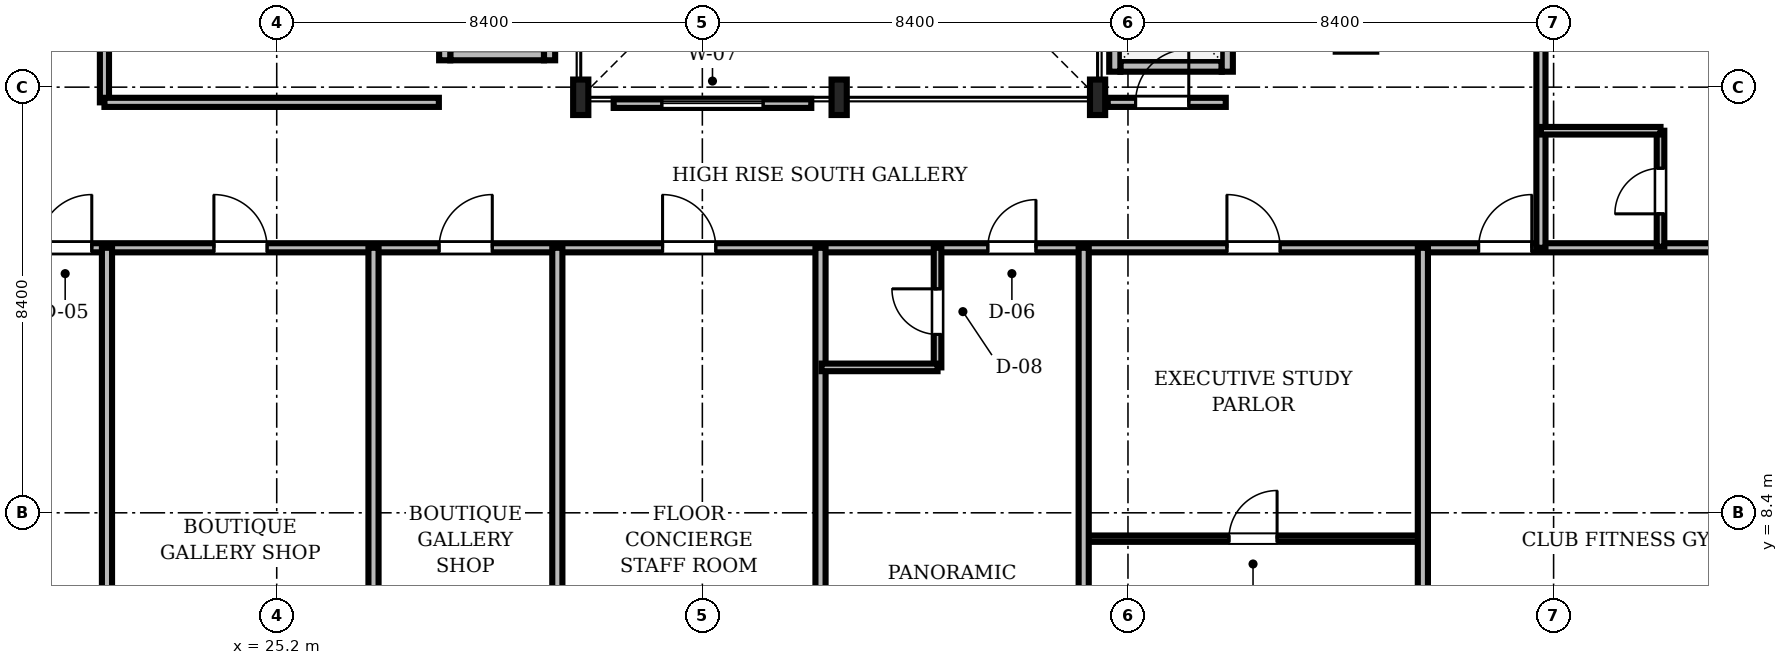
"""IFC4 building model, lengths in metres.
Left out: names, types, materials, properties, quantities, classifications, styles, units other than length and angle.
Written with IfcOpenShell. Run it as: python <this file> out.ifc"""

import sys

from ifc_helpers import new_model, si_unit, direction, frame, frame_2d, origin, origin_2d, place, context, subcontext, project, spatial, rectangle, i_section, extrude, source, transform, mapped, element, fill, save


model = new_model("IFC4")
c1 = context("Model", 3, precision=1e-05, world=origin(), true_north=direction((0.0, 1.0)))
c2 = subcontext(c1, "Body", "Model", "MODEL_VIEW")
j1 = project(units=[si_unit("LENGTHUNIT", "METRE"), si_unit("PLANEANGLEUNIT", "RADIAN")], contexts=[c1])
p1 = place(None, origin())
s1 = spatial("IfcSite", under=j1, at=p1, CompositionType="ELEMENT")
p2 = place(p1, origin())
s2 = spatial("IfcBuilding", under=s1, at=p2, CompositionType="ELEMENT")
p3 = place(p2, frame((0.0, 0.0, 196.05)))
s3 = spatial("IfcBuildingStorey", under=s2, at=p3, CompositionType="ELEMENT", Elevation=196.05)
m1 = source(origin(), c2, "Body", "SweptSolid", [
    extrude(i_section(OverallWidth=0.3, OverallDepth=0.7, WebThickness=0.017, FlangeThickness=0.032, FilletRadius=0.027, at=origin_2d()), origin(), (0.0, 0.0, 1.0), 3.53),
])
for number, where, z_axis, x_axis in (
    (1, (31.2, 16.6, 0.0), (0.0, 0.0, 1.0), (1.0, 0.0, 0.0)),
    (2, (36.3, 16.6, 0.0), (0.0, 0.0, 1.0), (1.0, 0.0, 0.0)),
    (3, (41.4, 16.6, 0.0), (0.0, 0.0, 1.0), (1.0, 0.0, 0.0)),
):
    element("IfcColumn", number, at=place(p3, frame(where, z_axis=z_axis, x_axis=x_axis)), inside=s3, PredefinedType="COLUMN", context=c2, shape_type="MappedRepresentation", body=[
        mapped(m1, transform((0.0, 0.0, 0.0), scale=1.0)),
    ])
m2 = source(origin(), c2, "Body", "SweptSolid", [
    extrude(rectangle(XDim=2.0, YDim=0.22, at=frame_2d((1.0, 0.0))), origin(), (0.0, 0.0, 1.0), 3.53),
])
p4 = place(p3, frame((41.85, 17.215, 0.0), z_axis=(0.0, 0.0, 1.0), x_axis=(1.0, 0.0, 0.0)))
e4 = element("IfcWall", 4, at=p4, inside=s3, PredefinedType="SOLIDWALL", context=c2, shape_type="MappedRepresentation", body=[
    mapped(m2, transform((0.0, 0.0, 0.0), scale=1.0)),
])
m3 = source(origin(), c2, "Body", "SweptSolid", [
    extrude(rectangle(XDim=2.19, YDim=0.22, at=frame_2d((1.095, 0.0))), origin(), (0.0, 0.0, 1.0), 3.53),
])
p5 = place(p3, frame((41.74, 17.105, 0.0), z_axis=(0.0, 0.0, 1.0), x_axis=(0.0, 1.0, 0.0)))
e5 = element("IfcWall", 5, at=p5, inside=s3, PredefinedType="SOLIDWALL", context=c2, shape_type="MappedRepresentation", body=[
    mapped(m3, transform((0.0, 0.0, 0.0), scale=1.0)),
])
p6 = place(p3, frame((43.96, 17.105, 0.0), z_axis=(0.0, 0.0, 1.0), x_axis=(0.0, 1.0, 0.0)))
e6 = element("IfcWall", 6, at=p6, inside=s3, PredefinedType="SOLIDWALL", context=c2, shape_type="MappedRepresentation", body=[
    mapped(m3, transform((0.0, 0.0, 0.0), scale=1.0)),
])
m4 = source(origin(), c2, "Body", "SweptSolid", [
    extrude(rectangle(XDim=1.1, YDim=2.2, at=frame_2d((0.55, 1.1))), frame((0.0, 0.12, 0.0), z_axis=(0.0, -1.0, 0.0), x_axis=(1.0, 0.0, 0.0)), (0.0, 0.0, 1.0), 0.24),
])
p7 = place(p6, frame((0.545, 0.0, 0.0)))
e7 = element("IfcOpeningElement", 7, at=p7, cuts=e6, PredefinedType="OPENING", context=c2, shape_type="MappedRepresentation", body=[
    mapped(m4, transform((0.0, 0.0, 0.0), scale=1.0)),
])
m5 = source(origin(), c2, "Body", "SweptSolid", [
    extrude(rectangle(XDim=1.85, YDim=0.22, at=frame_2d((0.925, 0.0))), origin(), (0.0, 0.0, 1.0), 2.972),
])
p8 = place(p3, frame((28.625, 17.44, 0.0), z_axis=(0.0, 0.0, 1.0), x_axis=(1.0, 0.0, 0.0)))
e8 = element("IfcWall", 8, at=p8, inside=s3, PredefinedType="SOLIDWALL", context=c2, shape_type="MappedRepresentation", body=[
    mapped(m5, transform((0.0, 0.0, 0.0), scale=1.0)),
])
m6 = source(origin(), c2, "Body", "SweptSolid", [
    extrude(rectangle(XDim=2.54, YDim=0.22, at=frame_2d((1.27, 0.0))), origin(), (0.0, 0.0, 1.0), 2.972),
])
p9 = place(p3, frame((28.515, 17.33, 0.0), z_axis=(0.0, 0.0, 1.0), x_axis=(0.0, 1.0, 0.0)))
e9 = element("IfcWall", 9, at=p9, inside=s3, PredefinedType="SOLIDWALL", context=c2, shape_type="MappedRepresentation", body=[
    mapped(m6, transform((0.0, 0.0, 0.0), scale=1.0)),
])
m7 = source(origin(), c2, "Body", "SweptSolid", [
    extrude(rectangle(XDim=2.54, YDim=0.22, at=frame_2d((1.27, 0.0))), origin(), (0.0, 0.0, 1.0), 3.53),
])
p10 = place(p3, frame((30.585, 17.33, 0.0), z_axis=(0.0, 0.0, 1.0), x_axis=(0.0, 1.0, 0.0)))
e10 = element("IfcWall", 10, at=p10, inside=s3, PredefinedType="SOLIDWALL", context=c2, shape_type="MappedRepresentation", body=[
    mapped(m7, transform((0.0, 0.0, 0.0), scale=1.0)),
])
m8 = source(origin(), c2, "Body", "SweptSolid", [
    extrude(rectangle(XDim=46.156, YDim=0.18, at=frame_2d((23.078, 0.0))), origin(), (0.0, 0.0, 1.0), 2.772),
])
p11 = place(p3, frame((11.422, 13.63, 0.0), z_axis=(0.0, 0.0, 1.0), x_axis=(1.0, 0.0, 0.0)))
e11 = element("IfcWall", 11, at=p11, inside=s3, PredefinedType="PARTITIONING", context=c2, shape_type="MappedRepresentation", body=[
    mapped(m8, transform((0.0, 0.0, 0.0), scale=1.0)),
])
m9 = source(origin(), c2, "Body", "SweptSolid", [
    extrude(rectangle(XDim=1.05, YDim=2.2, at=frame_2d((0.525, 1.1))), frame((0.0, 0.1, 0.0), z_axis=(0.0, -1.0, 0.0), x_axis=(1.0, 0.0, 0.0)), (0.0, 0.0, 1.0), 0.2),
])
p12 = place(p11, frame((9.078, 0.0, 0.0)))
e12 = element("IfcOpeningElement", 12, at=p12, cuts=e11, PredefinedType="OPENING", context=c2, shape_type="MappedRepresentation", body=[
    mapped(m9, transform((0.0, 0.0, 0.0), scale=1.0)),
])
p13 = place(p11, frame((12.538, 0.0, 0.0)))
e13 = element("IfcOpeningElement", 13, at=p13, cuts=e11, PredefinedType="OPENING", context=c2, shape_type="MappedRepresentation", body=[
    mapped(m9, transform((0.0, 0.0, 0.0), scale=1.0)),
])
p14 = place(p11, frame((16.982, 0.0, 0.0)))
e14 = element("IfcOpeningElement", 14, at=p14, cuts=e11, PredefinedType="OPENING", context=c2, shape_type="MappedRepresentation", body=[
    mapped(m9, transform((0.0, 0.0, 0.0), scale=1.0)),
])
p15 = place(p11, frame((21.393, 0.0, 0.0)))
e15 = element("IfcOpeningElement", 15, at=p15, cuts=e11, PredefinedType="OPENING", context=c2, shape_type="MappedRepresentation", body=[
    mapped(m9, transform((0.0, 0.0, 0.0), scale=1.0)),
])
m10 = source(origin(), c2, "Body", "SweptSolid", [
    extrude(rectangle(XDim=0.95, YDim=2.15, at=frame_2d((0.475, 1.075))), frame((0.0, 0.1, 0.0), z_axis=(0.0, -1.0, 0.0), x_axis=(1.0, 0.0, 0.0)), (0.0, 0.0, 1.0), 0.2),
])
p16 = place(p11, frame((27.812, 0.0, 0.0)))
e16 = element("IfcOpeningElement", 16, at=p16, cuts=e11, PredefinedType="OPENING", context=c2, shape_type="MappedRepresentation", body=[
    mapped(m10, transform((0.0, 0.0, 0.0), scale=1.0)),
])
p17 = place(p11, frame((32.531, 0.0, 0.0)))
e17 = element("IfcOpeningElement", 17, at=p17, cuts=e11, PredefinedType="OPENING", context=c2, shape_type="MappedRepresentation", body=[
    mapped(m9, transform((0.0, 0.0, 0.0), scale=1.0)),
])
p18 = place(p11, frame((37.498, 0.0, 0.0)))
e18 = element("IfcOpeningElement", 18, at=p18, cuts=e11, PredefinedType="OPENING", context=c2, shape_type="MappedRepresentation", body=[
    mapped(m9, transform((0.0, 0.0, 0.0), scale=1.0)),
])
m11 = source(origin(), c2, "Body", "SweptSolid", [
    extrude(rectangle(XDim=27.47, YDim=0.18, at=frame_2d((13.735, 0.0))), origin(), (0.0, 0.0, 1.0), 2.972),
])
p19 = place(p3, frame((50.15, 13.63, 0.0), z_axis=(0.0, 0.0, 1.0), x_axis=(0.0, 1.0, 0.0)))
e19 = element("IfcWall", 19, at=p19, inside=s3, PredefinedType="PARTITIONING", context=c2, shape_type="MappedRepresentation", body=[
    mapped(m11, transform((0.0, 0.0, 0.0), scale=1.0)),
])
p20 = place(p19, frame((4.071, 0.0, 0.0)))
e20 = element("IfcOpeningElement", 20, at=p20, cuts=e19, PredefinedType="OPENING", context=c2, shape_type="MappedRepresentation", body=[
    mapped(m9, transform((0.0, 0.0, 0.0), scale=1.0)),
])
p21 = place(p19, frame((10.884, 0.0, 0.0)))
e21 = element("IfcOpeningElement", 21, at=p21, cuts=e19, PredefinedType="OPENING", context=c2, shape_type="MappedRepresentation", body=[
    mapped(m9, transform((0.0, 0.0, 0.0), scale=1.0)),
])
p22 = place(p19, frame((17.696, 0.0, 0.0)))
e22 = element("IfcOpeningElement", 22, at=p22, cuts=e19, PredefinedType="OPENING", context=c2, shape_type="MappedRepresentation", body=[
    mapped(m9, transform((0.0, 0.0, 0.0), scale=1.0)),
])
p23 = place(p19, frame((24.509, 0.0, 0.0)))
e23 = element("IfcOpeningElement", 23, at=p23, cuts=e19, PredefinedType="OPENING", context=c2, shape_type="MappedRepresentation", body=[
    mapped(m9, transform((0.0, 0.0, 0.0), scale=1.0)),
])
m12 = source(origin(), c2, "Body", "SweptSolid", [
    extrude(rectangle(XDim=6.694, YDim=0.125, at=frame_2d((3.347, 0.0))), origin(), (0.0, 0.0, 1.0), 2.972),
])
p24 = place(p3, frame((41.126, 7.89, 0.0), z_axis=(0.0, 0.0, 1.0), x_axis=(1.0, 0.0, 0.0)))
e24 = element("IfcWall", 24, at=p24, inside=s3, PredefinedType="PARTITIONING", context=c2, shape_type="MappedRepresentation", body=[
    mapped(m12, transform((0.0, 0.0, 0.0), scale=1.0)),
])
m13 = source(origin(), c2, "Body", "SweptSolid", [
    extrude(rectangle(XDim=0.95, YDim=2.15, at=frame_2d((0.475, 1.075))), frame((0.0, 0.073, 0.0), z_axis=(0.0, -1.0, 0.0), x_axis=(1.0, 0.0, 0.0)), (0.0, 0.0, 1.0), 0.145),
])
p25 = place(p24, frame((2.867, 0.0, 0.0)))
e25 = element("IfcOpeningElement", 25, at=p25, cuts=e24, PredefinedType="OPENING", context=c2, shape_type="MappedRepresentation", body=[
    mapped(m13, transform((0.0, 0.0, 0.0), scale=1.0)),
])
m14 = source(origin(), c2, "Body", "SweptSolid", [
    extrude(rectangle(XDim=3.55, YDim=0.18, at=frame_2d((1.775, 0.0))), origin(), (0.0, 0.0, 1.0), 2.972),
])
p26 = place(p3, frame((21.8, 16.5, 0.0), z_axis=(0.0, 0.0, 1.0), x_axis=(0.0, 1.0, 0.0)))
e26 = element("IfcWall", 26, at=p26, inside=s3, PredefinedType="PARTITIONING", context=c2, shape_type="MappedRepresentation", body=[
    mapped(m14, transform((0.0, 0.0, 0.0), scale=1.0)),
])
p27 = place(p26, frame((1.15, 0.0, 0.0)))
e27 = element("IfcOpeningElement", 27, at=p27, cuts=e26, PredefinedType="OPENING", context=c2, shape_type="MappedRepresentation", body=[
    mapped(m9, transform((0.0, 0.0, 0.0), scale=1.0)),
])
m15 = source(origin(), c2, "Body", "SweptSolid", [
    extrude(rectangle(XDim=2.36, YDim=0.15, at=frame_2d((1.18, 0.0))), origin(), (0.0, 0.0, 1.0), 3.192),
])
p28 = place(p3, frame((38.242, 11.27, 0.0), z_axis=(0.0, 0.0, 1.0), x_axis=(0.0, 1.0, 0.0)))
e28 = element("IfcWall", 28, at=p28, inside=s3, PredefinedType="PARTITIONING", context=c2, shape_type="MappedRepresentation", body=[
    mapped(m15, transform((0.0, 0.0, 0.0), scale=1.0)),
])
m16 = source(origin(), c2, "Body", "SweptSolid", [
    extrude(rectangle(XDim=0.9, YDim=2.1, at=frame_2d((0.45, 1.05))), frame((0.0, 0.085, 0.0), z_axis=(0.0, -1.0, 0.0), x_axis=(1.0, 0.0, 0.0)), (0.0, 0.0, 1.0), 0.17),
])
p29 = place(p28, frame((0.65, 0.0, 0.0)))
e29 = element("IfcOpeningElement", 29, at=p29, cuts=e28, PredefinedType="OPENING", context=c2, shape_type="MappedRepresentation", body=[
    mapped(m16, transform((0.0, 0.0, 0.0), scale=1.0)),
])
m17 = source(origin(), c2, "Body", "SweptSolid", [
    extrude(rectangle(XDim=2.33, YDim=0.18, at=frame_2d((1.165, 0.0))), origin(), (0.0, 0.0, 1.0), 2.972),
])
p30 = place(p3, frame((41.6, 16.5, 0.0), z_axis=(0.0, 0.0, 1.0), x_axis=(1.0, 0.0, 0.0)))
e30 = element("IfcWall", 30, at=p30, inside=s3, PredefinedType="PARTITIONING", context=c2, shape_type="MappedRepresentation", body=[
    mapped(m17, transform((0.0, 0.0, 0.0), scale=1.0)),
])
p31 = place(p30, frame((0.55, 0.0, 0.0)))
e31 = element("IfcOpeningElement", 31, at=p31, cuts=e30, PredefinedType="OPENING", context=c2, shape_type="MappedRepresentation", body=[
    mapped(m9, transform((0.0, 0.0, 0.0), scale=1.0)),
])
m18 = source(origin(), c2, "Body", "SweptSolid", [
    extrude(rectangle(XDim=2.29, YDim=0.15, at=frame_2d((1.145, 0.0))), origin(), (0.0, 0.0, 1.0), 2.972),
])
p32 = place(p3, frame((52.51, 13.65, 0.0), z_axis=(0.0, 0.0, 1.0), x_axis=(0.0, 1.0, 0.0)))
e32 = element("IfcWall", 32, at=p32, inside=s3, PredefinedType="PARTITIONING", context=c2, shape_type="MappedRepresentation", body=[
    mapped(m18, transform((0.0, 0.0, 0.0), scale=1.0)),
])
p33 = place(p32, frame((0.65, 0.0, 0.0)))
e33 = element("IfcOpeningElement", 33, at=p33, cuts=e32, PredefinedType="OPENING", context=c2, shape_type="MappedRepresentation", body=[
    mapped(m16, transform((0.0, 0.0, 0.0), scale=1.0)),
])
m19 = source(origin(), c2, "Body", "SweptSolid", [
    extrude(rectangle(XDim=11.508, YDim=0.2, at=frame_2d((5.754, 0.0))), origin(), (0.0, 0.0, 1.0), 2.772),
])
for number, where, z_axis, x_axis in (
    (34, (21.85, 2.122, 0.0), (0.0, 0.0, 1.0), (0.0, 1.0, 0.0)),
    (35, (27.11, 2.122, 0.0), (0.0, 0.0, 1.0), (0.0, 1.0, 0.0)),
    (36, (30.738, 2.122, 0.0), (0.0, 0.0, 1.0), (0.0, 1.0, 0.0)),
):
    element("IfcWall", number, at=place(p3, frame(where, z_axis=z_axis, x_axis=x_axis)), inside=s3, PredefinedType="PARTITIONING", context=c2, shape_type="MappedRepresentation", body=[
        mapped(m19, transform((0.0, 0.0, 0.0), scale=1.0)),
    ])
m20 = source(origin(), c2, "Body", "SweptSolid", [
    extrude(rectangle(XDim=11.7, YDim=0.2, at=frame_2d((5.85, 0.0))), origin(), (0.0, 0.0, 1.0), 2.772),
])
p34 = place(p3, frame((35.932, 1.93, 0.0), z_axis=(0.0, 0.0, 1.0), x_axis=(0.0, 1.0, 0.0)))
e37 = element("IfcWall", 37, at=p34, inside=s3, PredefinedType="PARTITIONING", context=c2, shape_type="MappedRepresentation", body=[
    mapped(m20, transform((0.0, 0.0, 0.0), scale=1.0)),
])
for number, where, z_axis, x_axis in (
    (38, (41.126, 2.122, 0.0), (0.0, 0.0, 1.0), (0.0, 1.0, 0.0)),
    (39, (47.82, 2.122, 0.0), (0.0, 0.0, 1.0), (0.0, 1.0, 0.0)),
):
    element("IfcWall", number, at=place(p3, frame(where, z_axis=z_axis, x_axis=x_axis)), inside=s3, PredefinedType="PARTITIONING", context=c2, shape_type="MappedRepresentation", body=[
        mapped(m19, transform((0.0, 0.0, 0.0), scale=1.0)),
    ])
m21 = source(origin(), c2, "Body", "SweptSolid", [
    extrude(rectangle(XDim=6.6, YDim=0.18, at=frame_2d((3.3, 0.0))), origin(), (0.0, 0.0, 1.0), 3.53),
])
p35 = place(p3, frame((21.8, 16.5, 0.0), z_axis=(0.0, 0.0, 1.0), x_axis=(1.0, 0.0, 0.0)))
e40 = element("IfcWall", 40, at=p35, inside=s3, PredefinedType="PARTITIONING", context=c2, shape_type="MappedRepresentation", body=[
    mapped(m21, transform((0.0, 0.0, 0.0), scale=1.0)),
])
m22 = source(origin(), c2, "Body", "SweptSolid", [
    extrude(rectangle(XDim=2.36, YDim=0.15, at=frame_2d((1.18, 0.0))), origin(), (0.0, 0.0, 1.0), 3.53),
])
p36 = place(p3, frame((50.15, 15.94, 0.0), z_axis=(0.0, 0.0, 1.0), x_axis=(1.0, 0.0, 0.0)))
e41 = element("IfcWall", 41, at=p36, inside=s3, PredefinedType="PARTITIONING", context=c2, shape_type="MappedRepresentation", body=[
    mapped(m22, transform((0.0, 0.0, 0.0), scale=1.0)),
])
p37 = place(p3, frame((35.952, 11.27, 0.0), z_axis=(0.0, 0.0, 1.0), x_axis=(1.0, 0.0, 0.0)))
e42 = element("IfcWall", 42, at=p37, inside=s3, PredefinedType="PARTITIONING", context=c2, shape_type="MappedRepresentation", body=[
    mapped(m18, transform((0.0, 0.0, 0.0), scale=1.0)),
])
m23 = source(origin(), c2, "Body", "SweptSolid", [
    extrude(rectangle(XDim=3.9, YDim=0.18, at=frame_2d((1.95, 0.0))), origin(), (0.0, 0.0, 1.0), 3.072),
])
p38 = place(p3, frame((31.85, 16.48, 0.0), z_axis=(0.0, 0.0, 1.0), x_axis=(1.0, 0.0, 0.0)))
e43 = element("IfcWall", 43, at=p38, inside=s3, PredefinedType="PARTITIONING", context=c2, shape_type="MappedRepresentation", body=[
    mapped(m23, transform((0.0, 0.0, 0.0), scale=1.0)),
])
m24 = source(origin(), c2, "Body", "SweptSolid", [
    extrude(rectangle(XDim=2.0, YDim=1.9, at=frame_2d((1.0, 0.95))), frame((0.0, 0.1, 0.0), z_axis=(0.0, -1.0, 0.0), x_axis=(1.0, 0.0, 0.0)), (0.0, 0.0, 1.0), 0.2),
])
p39 = place(p38, frame((0.95, 0.0, 0.55)))
e44 = element("IfcOpeningElement", 44, at=p39, cuts=e43, PredefinedType="OPENING", context=c2, shape_type="MappedRepresentation", body=[
    mapped(m24, transform((0.0, 0.0, 0.0), scale=1.0)),
])
m25 = source(origin(), c2, "Body", "SweptSolid", [
    extrude(rectangle(XDim=1.05, YDim=2.2, at=frame_2d((0.525, 1.1))), frame((0.0, 0.025, 0.0), z_axis=(0.0, -1.0, 0.0), x_axis=(1.0, 0.0, 0.0)), (0.0, 0.0, 1.0), 0.05),
])
p40 = place(p12, origin())
e45 = element("IfcDoor", 45, at=p40, inside=s3, OperationType="SINGLE_SWING_RIGHT", PredefinedType="DOOR", context=c2, shape_type="MappedRepresentation", body=[
    mapped(m25, transform((0.0, 0.0, 0.0), scale=1.0)),
])
fill(e12, e45)
p41 = place(p13, origin())
e46 = element("IfcDoor", 46, at=p41, inside=s3, OperationType="SINGLE_SWING_LEFT", PredefinedType="DOOR", context=c2, shape_type="MappedRepresentation", body=[
    mapped(m25, transform((0.0, 0.0, 0.0), scale=1.0)),
])
fill(e13, e46)
p42 = place(p14, origin())
e47 = element("IfcDoor", 47, at=p42, inside=s3, OperationType="SINGLE_SWING_RIGHT", PredefinedType="DOOR", context=c2, shape_type="MappedRepresentation", body=[
    mapped(m25, transform((0.0, 0.0, 0.0), scale=1.0)),
])
fill(e14, e47)
p43 = place(p15, origin())
e48 = element("IfcDoor", 48, at=p43, inside=s3, OperationType="SINGLE_SWING_LEFT", PredefinedType="DOOR", context=c2, shape_type="MappedRepresentation", body=[
    mapped(m25, transform((0.0, 0.0, 0.0), scale=1.0)),
])
fill(e15, e48)
m26 = source(origin(), c2, "Body", "SweptSolid", [
    extrude(rectangle(XDim=0.95, YDim=2.15, at=frame_2d((0.475, 1.075))), frame((0.0, 0.025, 0.0), z_axis=(0.0, -1.0, 0.0), x_axis=(1.0, 0.0, 0.0)), (0.0, 0.0, 1.0), 0.05),
])
p44 = place(p16, origin())
e49 = element("IfcDoor", 49, at=p44, inside=s3, OperationType="SINGLE_SWING_RIGHT", PredefinedType="DOOR", context=c2, shape_type="MappedRepresentation", body=[
    mapped(m26, transform((0.0, 0.0, 0.0), scale=1.0)),
])
fill(e16, e49)
p45 = place(p17, origin())
e50 = element("IfcDoor", 50, at=p45, inside=s3, OperationType="SINGLE_SWING_LEFT", PredefinedType="DOOR", context=c2, shape_type="MappedRepresentation", body=[
    mapped(m25, transform((0.0, 0.0, 0.0), scale=1.0)),
])
fill(e17, e50)
p46 = place(p18, origin())
e51 = element("IfcDoor", 51, at=p46, inside=s3, OperationType="SINGLE_SWING_RIGHT", PredefinedType="DOOR", context=c2, shape_type="MappedRepresentation", body=[
    mapped(m25, transform((0.0, 0.0, 0.0), scale=1.0)),
])
fill(e18, e51)
p47 = place(p25, origin())
e52 = element("IfcDoor", 52, at=p47, inside=s3, OperationType="SINGLE_SWING_RIGHT", PredefinedType="DOOR", context=c2, shape_type="MappedRepresentation", body=[
    mapped(m26, transform((0.0, 0.0, 0.0), scale=1.0)),
])
fill(e25, e52)
m27 = source(origin(), c2, "Body", "SweptSolid", [
    extrude(rectangle(XDim=0.9, YDim=2.1, at=frame_2d((0.45, 1.05))), frame((0.0, 0.025, 0.0), z_axis=(0.0, -1.0, 0.0), x_axis=(1.0, 0.0, 0.0)), (0.0, 0.0, 1.0), 0.05),
])
p48 = place(p29, origin())
e53 = element("IfcDoor", 53, at=p48, inside=s3, OperationType="SINGLE_SWING_RIGHT", PredefinedType="DOOR", context=c2, shape_type="MappedRepresentation", body=[
    mapped(m27, transform((0.0, 0.0, 0.0), scale=1.0)),
])
fill(e29, e53)
p49 = place(p31, origin())
e54 = element("IfcDoor", 54, at=p49, inside=s3, OperationType="SINGLE_SWING_RIGHT", PredefinedType="DOOR", context=c2, shape_type="MappedRepresentation", body=[
    mapped(m25, transform((0.0, 0.0, 0.0), scale=1.0)),
])
fill(e31, e54)
p50 = place(p33, origin())
e55 = element("IfcDoor", 55, at=p50, inside=s3, OperationType="SINGLE_SWING_LEFT", PredefinedType="DOOR", context=c2, shape_type="MappedRepresentation", body=[
    mapped(m27, transform((0.0, 0.0, 0.0), scale=1.0)),
])
fill(e33, e55)
m28 = source(origin(), c2, "Body", "SweptSolid", [
    extrude(rectangle(XDim=2.0, YDim=1.9, at=frame_2d((1.0, 0.95))), frame((0.0, 0.03, 0.0), z_axis=(0.0, -1.0, 0.0), x_axis=(1.0, 0.0, 0.0)), (0.0, 0.0, 1.0), 0.06),
])
p51 = place(p39, origin())
e56 = element("IfcWindow", 56, at=p51, inside=s3, PartitioningType="SINGLE_PANEL", PredefinedType="WINDOW", context=c2, shape_type="MappedRepresentation", body=[
    mapped(m28, transform((0.0, 0.0, 0.0), scale=1.0)),
])
fill(e44, e56)
save(model, sys.argv[1])
